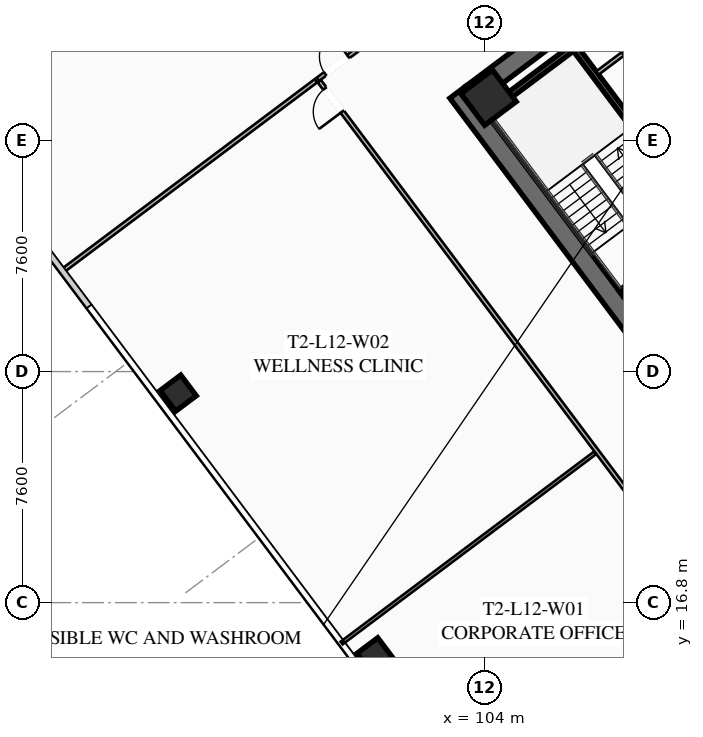
"""IFC4 building model, lengths in metres.
Left out: names, types, materials, properties, quantities, classifications, styles, units other than length and angle.
Written with IfcOpenShell. Run it as: python <this file> out.ifc"""

import sys

from ifc_helpers import new_model, si_unit, direction, frame, frame_2d, origin, origin_2d, place, context, subcontext, project, spatial, rectangle, hollow_rectangle, extrude, element, fill, save


model = new_model("IFC4")
c1 = context("Model", 3, precision=1e-05, world=origin(), true_north=direction((0.0, 1.0)))
c2 = subcontext(c1, "Body", "Model", "MODEL_VIEW")
j1 = project(units=[si_unit("LENGTHUNIT", "METRE"), si_unit("PLANEANGLEUNIT", "RADIAN")], contexts=[c1])
p1 = place(None, origin())
s1 = spatial("IfcSite", under=j1, at=p1, CompositionType="ELEMENT")
p2 = place(p1, origin())
s2 = spatial("IfcBuilding", under=s1, at=p2, CompositionType="ELEMENT")
p3 = place(p2, frame((0.0, 0.0, 49.45)))
s3 = spatial("IfcBuildingStorey", under=s2, at=p3, CompositionType="ELEMENT", Elevation=49.45)
p4 = place(p3, frame((112.476, 21.107, 0.0), z_axis=(0.0, 0.0, 1.0), x_axis=(-0.600005007985, 0.799996243986, 0.0)))
e1 = element("IfcWall", 1, at=p4, inside=s3, PredefinedType="SHEAR", context=c2, shape_type="SweptSolid", body=[
    extrude(rectangle(XDim=15.6, YDim=0.65, at=frame_2d((7.8, 0.0))), origin(), (0.0, 0.0, 1.0), 3.55),
])
p5 = place(p3, frame((103.571, 33.522, 0.0), z_axis=(0.0, 0.0, 1.0), x_axis=(0.799998028465, 0.600002628705, 0.0)))
e2 = element("IfcWall", 2, at=p5, inside=s3, PredefinedType="SHEAR", context=c2, shape_type="SweptSolid", body=[
    extrude(rectangle(XDim=14.86, YDim=0.65, at=frame_2d((7.43, 0.0))), origin(), (0.0, 0.0, 1.0), 3.55),
])
p6 = place(p5, frame((4.48, 0.0, 0.0)))
e3 = element("IfcOpeningElement", 3, at=p6, cuts=e2, PredefinedType="OPENING", context=c2, shape_type="SweptSolid", body=[
    extrude(rectangle(XDim=1.25, YDim=2.25, at=frame_2d((0.625, 1.125))), frame((0.0, 0.335, 0.0), z_axis=(0.0, -1.0, 0.0), x_axis=(1.0, 0.0, 0.0)), (0.0, 0.0, 1.0), 0.67),
])
p7 = place(p5, frame((9.53, 0.0, 0.0)))
e4 = element("IfcOpeningElement", 4, at=p7, cuts=e2, PredefinedType="OPENING", context=c2, shape_type="SweptSolid", body=[
    extrude(rectangle(XDim=1.25, YDim=2.25, at=frame_2d((0.625, 1.125))), frame((0.0, 0.335, 0.0), z_axis=(0.0, -1.0, 0.0), x_axis=(1.0, 0.0, 0.0)), (0.0, 0.0, 1.0), 0.67),
])
p8 = place(p3, frame((104.13, 33.41, 0.0), z_axis=(0.0, 0.0, 1.0), x_axis=(0.799999996291, 0.600000004945, 0.0)))
e5 = element("IfcColumn", 5, at=p8, inside=s3, PredefinedType="COLUMN", context=c2, shape_type="SweptSolid", body=[
    extrude(hollow_rectangle(XDim=1.3, YDim=1.3, WallThickness=0.05, at=origin_2d()), origin(), (0.0, 0.0, 1.0), 3.35),
])
for number, where, z_axis, x_axis in (
    (6, (93.92, 23.69, 0.0), (0.0, 0.0, 1.0), (0.8, 0.6, 0.0)),
    (7, (100.4, 15.05, 0.0), (0.0, 0.0, 1.0), (0.8, 0.6, 0.0)),
):
    element("IfcColumn", number, at=place(p3, frame(where, z_axis=z_axis, x_axis=x_axis)), inside=s3, PredefinedType="COLUMN", context=c2, shape_type="SweptSolid", body=[
        extrude(hollow_rectangle(XDim=0.85, YDim=0.85, WallThickness=0.035, at=origin_2d()), origin(), (0.0, 0.0, 1.0), 3.35),
    ])
p9 = place(p3, frame((111.44, 29.08, 0.0), z_axis=(0.0, 0.0, 1.0), x_axis=(-0.600009827119, 0.799992629566, 0.0)))
e8 = element("IfcWall", 8, at=p9, inside=s3, PredefinedType="SHEAR", context=c2, shape_type="SweptSolid", body=[
    extrude(rectangle(XDim=7.95, YDim=0.2, at=frame_2d((3.975, 0.0))), origin(), (0.0, 0.0, 1.0), 3.35),
])
p10 = place(p9, frame((0.45, 0.0, 0.0)))
e9 = element("IfcOpeningElement", 9, at=p10, cuts=e8, PredefinedType="OPENING", context=c2, shape_type="SweptSolid", body=[
    extrude(rectangle(XDim=1.15, YDim=2.2, at=frame_2d((0.575, 1.1))), frame((0.0, 0.11, 0.0), z_axis=(0.0, -1.0, 0.0), x_axis=(1.0, 0.0, 0.0)), (0.0, 0.0, 1.0), 0.22),
])
for number, where, z_axis, x_axis in (
    (10, (108.476, 26.982, 0.0), (0.0, 0.0, 1.0), (0.8, 0.6, 0.0)),
    (11, (104.036, 32.902, 0.0), (0.0, 0.0, 1.0), (0.8, 0.6, 0.0)),
):
    element("IfcWall", number, at=place(p3, frame(where, z_axis=z_axis, x_axis=x_axis)), inside=s3, PredefinedType="SHEAR", context=c2, shape_type="SweptSolid", body=[
        extrude(rectangle(XDim=3.73, YDim=0.2, at=frame_2d((1.865, 0.0))), origin(), (0.0, 0.0, 1.0), 3.35),
    ])
p11 = place(p3, frame((107.71, 34.22, 0.0), z_axis=(0.0, 0.0, 1.0), x_axis=(0.799981399002, 0.60002480053, 0.0)))
e12 = element("IfcWall", 12, at=p11, inside=s3, PredefinedType="PARTITIONING", context=c2, shape_type="SweptSolid", body=[
    extrude(rectangle(XDim=3.15, YDim=0.135, at=frame_2d((1.575, 0.0))), origin(), (0.0, 0.0, 1.0), 2.703),
])
p12 = place(p11, frame((1.05, 0.0, 0.0)))
e13 = element("IfcOpeningElement", 13, at=p12, cuts=e12, PredefinedType="OPENING", context=c2, shape_type="SweptSolid", body=[
    extrude(rectangle(XDim=1.05, YDim=2.2, at=frame_2d((0.525, 1.1))), frame((0.0, 0.077, 0.0), z_axis=(0.0, -1.0, 0.0), x_axis=(1.0, 0.0, 0.0)), (0.0, 0.0, 1.0), 0.155),
])
p13 = place(p3, frame((98.516, 34.012, 0.0), z_axis=(0.0, 0.0, 1.0), x_axis=(0.799998035726, 0.600002619023, 0.0)))
e14 = element("IfcWall", 14, at=p13, inside=s3, PredefinedType="PARTITIONING", context=c2, shape_type="SweptSolid", body=[
    extrude(rectangle(XDim=29.83, YDim=0.135, at=frame_2d((14.915, 0.0))), origin(), (0.0, 0.0, 1.0), 2.703),
])
p14 = place(p13, frame((0.3, 0.0, 0.0)))
e15 = element("IfcOpeningElement", 15, at=p14, cuts=e14, PredefinedType="OPENING", context=c2, shape_type="SweptSolid", body=[
    extrude(rectangle(XDim=0.95, YDim=2.05, at=frame_2d((0.475, 1.025))), frame((0.0, 0.077, 0.0), z_axis=(0.0, -1.0, 0.0), x_axis=(1.0, 0.0, 0.0)), (0.0, 0.0, 1.0), 0.155),
])
p15 = place(p13, frame((28.58, 0.0, 0.0)))
e16 = element("IfcOpeningElement", 16, at=p15, cuts=e14, PredefinedType="OPENING", context=c2, shape_type="SweptSolid", body=[
    extrude(rectangle(XDim=0.95, YDim=2.05, at=frame_2d((0.475, 1.025))), frame((0.0, 0.077, 0.0), z_axis=(0.0, -1.0, 0.0), x_axis=(1.0, 0.0, 0.0)), (0.0, 0.0, 1.0), 0.155),
])
p16 = place(p3, frame((111.548, 16.636, 0.0), z_axis=(0.0, 0.0, 1.0), x_axis=(-0.600003610192, 0.799997292343, 0.0)))
e17 = element("IfcWall", 17, at=p16, inside=s3, PredefinedType="PARTITIONING", context=c2, shape_type="SweptSolid", body=[
    extrude(rectangle(XDim=21.64, YDim=0.135, at=frame_2d((10.82, 0.0))), origin(), (0.0, 0.0, 1.0), 2.703),
])
p17 = place(p16, frame((0.3, 0.0, 0.0)))
e18 = element("IfcOpeningElement", 18, at=p17, cuts=e17, PredefinedType="OPENING", context=c2, shape_type="SweptSolid", body=[
    extrude(rectangle(XDim=0.95, YDim=2.05, at=frame_2d((0.475, 1.025))), frame((0.0, 0.077, 0.0), z_axis=(0.0, -1.0, 0.0), x_axis=(1.0, 0.0, 0.0)), (0.0, 0.0, 1.0), 0.155),
])
p18 = place(p16, frame((20.39, 0.0, 0.0)))
e19 = element("IfcOpeningElement", 19, at=p18, cuts=e17, PredefinedType="OPENING", context=c2, shape_type="SweptSolid", body=[
    extrude(rectangle(XDim=0.95, YDim=2.05, at=frame_2d((0.475, 1.025))), frame((0.0, 0.077, 0.0), z_axis=(0.0, -1.0, 0.0), x_axis=(1.0, 0.0, 0.0)), (0.0, 0.0, 1.0), 0.155),
])
p19 = place(p3, frame((98.452, 33.964, 0.0), z_axis=(0.0, 0.0, 1.0), x_axis=(-0.799988753532, -0.600014994998, 0.0)))
e20 = element("IfcWall", 20, at=p19, inside=s3, PredefinedType="PARTITIONING", context=c2, shape_type="SweptSolid", body=[
    extrude(rectangle(XDim=10.42, YDim=0.135, at=frame_2d((5.21, 0.0))), origin(), (0.0, 0.0, 1.0), 2.703),
])
p20 = place(p3, frame((103.196, 10.272, 0.0), z_axis=(0.0, 0.0, 1.0), x_axis=(0.8, 0.6, 0.0)))
e21 = element("IfcWall", 21, at=p20, inside=s3, PredefinedType="PARTITIONING", context=c2, shape_type="SweptSolid", body=[
    extrude(rectangle(XDim=10.42, YDim=0.135, at=frame_2d((5.21, 0.0))), origin(), (0.0, 0.0, 1.0), 2.703),
])
p21 = place(p3, frame((99.296, 15.472, 0.0), z_axis=(0.0, 0.0, 1.0), x_axis=(0.799997188462, 0.600003748699, 0.0)))
e22 = element("IfcWall", 22, at=p21, inside=s3, PredefinedType="PARTITIONING", context=c2, shape_type="SweptSolid", body=[
    extrude(rectangle(XDim=10.42, YDim=0.11, at=frame_2d((5.21, 0.0))), origin(), (0.0, 0.0, 1.0), 2.703),
])
p22 = place(p12, origin())
e23 = element("IfcDoor", 23, at=p22, inside=s3, OperationType="SINGLE_SWING_LEFT", PredefinedType="DOOR", context=c2, shape_type="SweptSolid", body=[
    extrude(rectangle(XDim=1.05, YDim=2.2, at=frame_2d((0.525, 1.1))), frame((0.0, 0.025, 0.0), z_axis=(0.0, -1.0, 0.0), x_axis=(1.0, 0.0, 0.0)), (0.0, 0.0, 1.0), 0.05),
])
fill(e13, e23)
p23 = place(p14, origin())
e24 = element("IfcDoor", 24, at=p23, inside=s3, OperationType="SINGLE_SWING_RIGHT", PredefinedType="DOOR", context=c2, shape_type="SweptSolid", body=[
    extrude(rectangle(XDim=0.95, YDim=2.05, at=frame_2d((0.475, 1.025))), frame((0.0, 0.025, 0.0), z_axis=(0.0, -1.0, 0.0), x_axis=(1.0, 0.0, 0.0)), (0.0, 0.0, 1.0), 0.05),
])
fill(e15, e24)
p24 = place(p18, origin())
e25 = element("IfcDoor", 25, at=p24, inside=s3, OperationType="SINGLE_SWING_LEFT", PredefinedType="DOOR", context=c2, shape_type="SweptSolid", body=[
    extrude(rectangle(XDim=0.95, YDim=2.05, at=frame_2d((0.475, 1.025))), frame((0.0, 0.025, 0.0), z_axis=(0.0, -1.0, 0.0), x_axis=(1.0, 0.0, 0.0)), (0.0, 0.0, 1.0), 0.05),
])
fill(e19, e25)
save(model, sys.argv[1])
